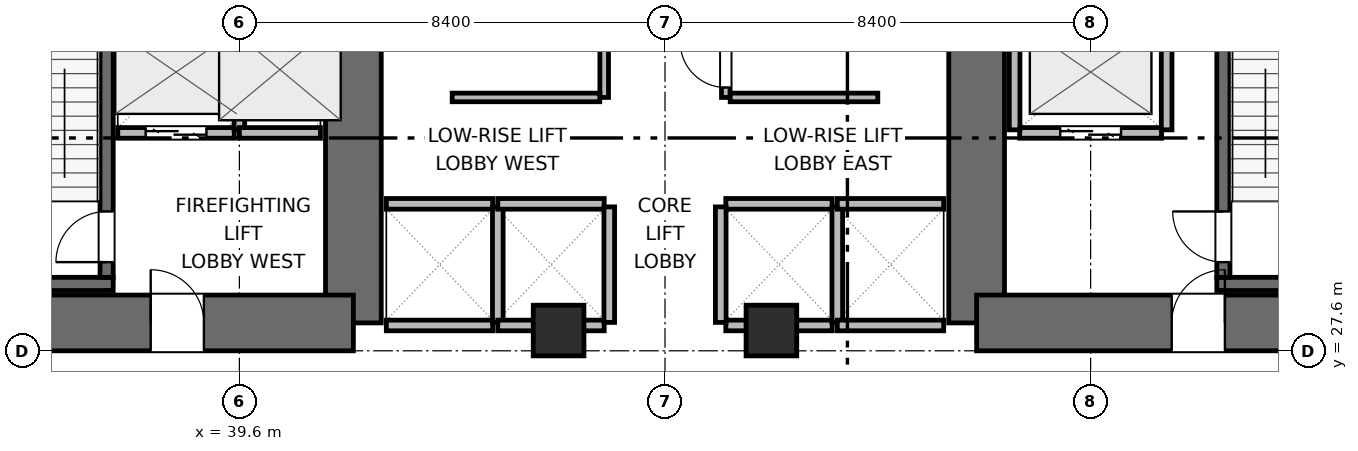
"""IFC4 building model, lengths in metres.
Left out: names, types, materials, properties, quantities, classifications, styles, units other than length and angle.
Written with IfcOpenShell. Run it as: python <this file> out.ifc"""

import sys

from ifc_helpers import new_model, si_unit, direction, frame, frame_2d, origin, origin_2d, place, context, subcontext, project, spatial, rectangle, extrude, element, fill, save


model = new_model("IFC4")
c1 = context("Model", 3, precision=1e-05, world=origin(), true_north=direction((0.0, 1.0)))
c2 = subcontext(c1, "Body", "Model", "MODEL_VIEW")
j1 = project(units=[si_unit("LENGTHUNIT", "METRE"), si_unit("PLANEANGLEUNIT", "RADIAN")], contexts=[c1])
p1 = place(None, origin())
s1 = spatial("IfcSite", under=j1, at=p1, CompositionType="ELEMENT")
p2 = place(p1, origin())
s2 = spatial("IfcBuilding", under=s1, at=p2, CompositionType="ELEMENT")
p3 = place(p2, frame((0.0, 0.0, 8.7)))
s3 = spatial("IfcBuildingStorey", under=s2, at=p3, CompositionType="ELEMENT", Elevation=8.7)
p4 = place(p3, frame((41.85, 28.15, 0.0), z_axis=(0.0, 0.0, 1.0), x_axis=(0.0, 1.0, 0.0)))
e1 = element("IfcWall", 1, at=p4, inside=s3, PredefinedType="SHEAR", context=c2, shape_type="SweptSolid", body=[
    extrude(rectangle(XDim=6.25, YDim=1.1, at=frame_2d((3.125, 0.0))), origin(), (0.0, 0.0, 1.0), 4.2),
])
p5 = place(p3, frame((32.95, 28.15, 0.0), z_axis=(0.0, 0.0, 1.0), x_axis=(1.0, 0.0, 0.0)))
e2 = element("IfcWall", 2, at=p5, inside=s3, PredefinedType="SHEAR", context=c2, shape_type="SweptSolid", body=[
    extrude(rectangle(XDim=8.9, YDim=1.1, at=frame_2d((4.45, 0.0))), origin(), (0.0, 0.0, 1.0), 4.2),
])
p6 = place(p5, frame((4.9, 0.0, 0.0)))
e3 = element("IfcOpeningElement", 3, at=p6, cuts=e2, PredefinedType="OPENING", context=c2, shape_type="SweptSolid", body=[
    extrude(rectangle(XDim=1.05, YDim=2.04, at=frame_2d((0.525, 1.02))), frame((0.0, 0.56, 0.0), z_axis=(0.0, -1.0, 0.0), x_axis=(1.0, 0.0, 0.0)), (0.0, 0.0, 1.0), 1.12),
])
p7 = place(p3, frame((54.15, 28.15, 0.0), z_axis=(0.0, 0.0, 1.0), x_axis=(0.0, 1.0, 0.0)))
e4 = element("IfcWall", 4, at=p7, inside=s3, PredefinedType="SHEAR", context=c2, shape_type="SweptSolid", body=[
    extrude(rectangle(XDim=7.65, YDim=1.1, at=frame_2d((3.825, 0.0))), origin(), (0.0, 0.0, 1.0), 4.2),
])
p8 = place(p3, frame((54.15, 28.15, 0.0), z_axis=(0.0, 0.0, 1.0), x_axis=(1.0, 0.0, 0.0)))
e5 = element("IfcWall", 5, at=p8, inside=s3, PredefinedType="SHEAR", context=c2, shape_type="SweptSolid", body=[
    extrude(rectangle(XDim=8.9, YDim=1.1, at=frame_2d((4.45, 0.0))), origin(), (0.0, 0.0, 1.0), 4.2),
])
p9 = place(p8, frame((3.85, 0.0, 0.0)))
e6 = element("IfcOpeningElement", 6, at=p9, cuts=e5, PredefinedType="OPENING", context=c2, shape_type="SweptSolid", body=[
    extrude(rectangle(XDim=1.05, YDim=2.04, at=frame_2d((0.525, 1.02))), frame((0.0, 0.56, 0.0), z_axis=(0.0, -1.0, 0.0), x_axis=(1.0, 0.0, 0.0)), (0.0, 0.0, 1.0), 1.12),
])
p10 = place(p3, frame((33.5, 28.92, 0.0), z_axis=(0.0, 0.0, 1.0), x_axis=(1.0, 0.0, 0.0)))
e7 = element("IfcWall", 7, at=p10, inside=s3, PredefinedType="SHEAR", context=c2, shape_type="SweptSolid", body=[
    extrude(rectangle(XDim=3.61, YDim=0.26, at=frame_2d((1.805, 0.0))), origin(), (0.0, 0.0, 1.0), 4.2),
])
p11 = place(p3, frame((36.98, 29.05, 0.0), z_axis=(0.0, 0.0, 1.0), x_axis=(0.0, 1.0, 0.0)))
e8 = element("IfcWall", 8, at=p11, inside=s3, PredefinedType="SHEAR", context=c2, shape_type="SweptSolid", body=[
    extrude(rectangle(XDim=7.6, YDim=0.26, at=frame_2d((3.8, 0.0))), origin(), (0.0, 0.0, 1.0), 4.2),
])
p12 = place(p11, frame((0.3, 0.0, 0.0)))
e9 = element("IfcOpeningElement", 9, at=p12, cuts=e8, PredefinedType="OPENING", context=c2, shape_type="SweptSolid", body=[
    extrude(rectangle(XDim=1.0, YDim=2.04, at=frame_2d((0.5, 1.02))), frame((0.0, 0.14, 0.0), z_axis=(0.0, -1.0, 0.0), x_axis=(1.0, 0.0, 0.0)), (0.0, 0.0, 1.0), 0.28),
])
p13 = place(p3, frame((58.89, 28.92, 0.0), z_axis=(0.0, 0.0, 1.0), x_axis=(1.0, 0.0, 0.0)))
e10 = element("IfcWall", 10, at=p13, inside=s3, PredefinedType="SHEAR", context=c2, shape_type="SweptSolid", body=[
    extrude(rectangle(XDim=3.61, YDim=0.26, at=frame_2d((1.805, 0.0))), origin(), (0.0, 0.0, 1.0), 4.2),
])
p14 = place(p3, frame((59.02, 29.05, 0.0), z_axis=(0.0, 0.0, 1.0), x_axis=(0.0, 1.0, 0.0)))
e11 = element("IfcWall", 11, at=p14, inside=s3, PredefinedType="SHEAR", context=c2, shape_type="SweptSolid", body=[
    extrude(rectangle(XDim=7.6, YDim=0.26, at=frame_2d((3.8, 0.0))), origin(), (0.0, 0.0, 1.0), 4.2),
])
p15 = place(p14, frame((0.3, 0.0, 0.0)))
e12 = element("IfcOpeningElement", 12, at=p15, cuts=e11, PredefinedType="OPENING", context=c2, shape_type="SweptSolid", body=[
    extrude(rectangle(XDim=1.0, YDim=2.04, at=frame_2d((0.5, 1.02))), frame((0.0, 0.14, 0.0), z_axis=(0.0, -1.0, 0.0), x_axis=(1.0, 0.0, 0.0)), (0.0, 0.0, 1.0), 0.28),
])
for number, where, z_axis, x_axis in (
    (13, (45.9, 28.0, 0.0), (0.0, 0.0, 1.0), (1.0, 0.0, 0.0)),
    (14, (50.1, 28.0, 0.0), (0.0, 0.0, 1.0), (1.0, 0.0, 0.0)),
):
    element("IfcColumn", number, at=place(p3, frame(where, z_axis=z_axis, x_axis=x_axis)), inside=s3, PredefinedType="COLUMN", context=c2, shape_type="SweptSolid", body=[
        extrude(rectangle(XDim=1.0, YDim=1.0, at=origin_2d()), origin(), (0.0, 0.0, 1.0), 4.2),
    ])
p16 = place(p3, frame((37.2, 31.9, 0.0), z_axis=(0.0, 0.0, 1.0), x_axis=(1.0, 0.0, 0.0)))
e15 = element("IfcWall", 15, at=p16, inside=s3, PredefinedType="PARTITIONING", context=c2, shape_type="SweptSolid", body=[
    extrude(rectangle(XDim=2.3, YDim=0.21, at=frame_2d((1.15, 0.0))), origin(), (0.0, 0.0, 1.0), 3.88),
])
p17 = place(p16, frame((0.55, 0.0, 0.0)))
e16 = element("IfcOpeningElement", 16, at=p17, cuts=e15, PredefinedType="OPENING", context=c2, shape_type="SweptSolid", body=[
    extrude(rectangle(XDim=1.2, YDim=2.04, at=frame_2d((0.6, 1.02))), frame((0.0, 0.115, 0.0), z_axis=(0.0, -1.0, 0.0), x_axis=(1.0, 0.0, 0.0)), (0.0, 0.0, 1.0), 0.23),
])
p18 = place(p3, frame((39.6, 31.96, 0.0), z_axis=(0.0, 0.0, 1.0), x_axis=(0.0, 1.0, 0.0)))
e17 = element("IfcWall", 17, at=p18, inside=s3, PredefinedType="PARTITIONING", context=c2, shape_type="SweptSolid", body=[
    extrude(rectangle(XDim=2.28, YDim=0.21, at=frame_2d((1.14, 0.0))), origin(), (0.0, 0.0, 1.0), 3.88),
])
p19 = place(p3, frame((55.0, 31.9, 0.0), z_axis=(0.0, 0.0, 1.0), x_axis=(1.0, 0.0, 0.0)))
e18 = element("IfcWall", 18, at=p19, inside=s3, PredefinedType="PARTITIONING", context=c2, shape_type="SweptSolid", body=[
    extrude(rectangle(XDim=2.8, YDim=0.21, at=frame_2d((1.4, 0.0))), origin(), (0.0, 0.0, 1.0), 3.88),
])
p20 = place(p19, frame((0.8, 0.0, 0.0)))
e19 = element("IfcOpeningElement", 19, at=p20, cuts=e18, PredefinedType="OPENING", context=c2, shape_type="SweptSolid", body=[
    extrude(rectangle(XDim=1.2, YDim=2.04, at=frame_2d((0.6, 1.02))), frame((0.0, 0.115, 0.0), z_axis=(0.0, -1.0, 0.0), x_axis=(1.0, 0.0, 0.0)), (0.0, 0.0, 1.0), 0.23),
])
for number, where, z_axis, x_axis in (
    (20, (54.9, 31.96, 0.0), (0.0, 0.0, 1.0), (0.0, 1.0, 0.0)),
    (21, (57.9, 31.96, 0.0), (0.0, 0.0, 1.0), (0.0, 1.0, 0.0)),
):
    element("IfcWall", number, at=place(p3, frame(where, z_axis=z_axis, x_axis=x_axis)), inside=s3, PredefinedType="PARTITIONING", context=c2, shape_type="SweptSolid", body=[
        extrude(rectangle(XDim=2.28, YDim=0.21, at=frame_2d((1.14, 0.0))), origin(), (0.0, 0.0, 1.0), 3.88),
    ])
p21 = place(p3, frame((39.6, 31.9, 0.0), z_axis=(0.0, 0.0, 1.0), x_axis=(1.0, 0.0, 0.0)))
e22 = element("IfcWall", 22, at=p21, inside=s3, PredefinedType="PARTITIONING", context=c2, shape_type="SweptSolid", body=[
    extrude(rectangle(XDim=1.6, YDim=0.21, at=frame_2d((0.8, 0.0))), origin(), (0.0, 0.0, 1.0), 3.88),
])
p22 = place(p3, frame((42.5, 30.5, 0.0), z_axis=(0.0, 0.0, 1.0), x_axis=(1.0, 0.0, 0.0)))
e23 = element("IfcWall", 23, at=p22, inside=s3, PredefinedType="PARTITIONING", context=c2, shape_type="SweptSolid", body=[
    extrude(rectangle(XDim=2.1, YDim=0.21, at=frame_2d((1.05, 0.0))), origin(), (0.0, 0.0, 1.0), 3.88),
])
p23 = place(p3, frame((42.5, 28.1, 0.0), z_axis=(0.0, 0.0, 1.0), x_axis=(1.0, 0.0, 0.0)))
e24 = element("IfcWall", 24, at=p23, inside=s3, PredefinedType="PARTITIONING", context=c2, shape_type="SweptSolid", body=[
    extrude(rectangle(XDim=2.1, YDim=0.21, at=frame_2d((1.05, 0.0))), origin(), (0.0, 0.0, 1.0), 2.765),
])
p24 = place(p3, frame((44.7, 28.16, 0.0), z_axis=(0.0, 0.0, 1.0), x_axis=(0.0, 1.0, 0.0)))
e25 = element("IfcWall", 25, at=p24, inside=s3, PredefinedType="PARTITIONING", context=c2, shape_type="SweptSolid", body=[
    extrude(rectangle(XDim=2.28, YDim=0.21, at=frame_2d((1.14, 0.0))), origin(), (0.0, 0.0, 1.0), 3.88),
])
p25 = place(p3, frame((44.7, 30.5, 0.0), z_axis=(0.0, 0.0, 1.0), x_axis=(1.0, 0.0, 0.0)))
e26 = element("IfcWall", 26, at=p25, inside=s3, PredefinedType="PARTITIONING", context=c2, shape_type="SweptSolid", body=[
    extrude(rectangle(XDim=2.1, YDim=0.21, at=frame_2d((1.05, 0.0))), origin(), (0.0, 0.0, 1.0), 3.88),
])
p26 = place(p3, frame((44.7, 28.1, 0.0), z_axis=(0.0, 0.0, 1.0), x_axis=(1.0, 0.0, 0.0)))
e27 = element("IfcWall", 27, at=p26, inside=s3, PredefinedType="PARTITIONING", context=c2, shape_type="SweptSolid", body=[
    extrude(rectangle(XDim=2.1, YDim=0.21, at=frame_2d((1.05, 0.0))), origin(), (0.0, 0.0, 1.0), 2.765),
])
p27 = place(p3, frame((46.9, 28.16, 0.0), z_axis=(0.0, 0.0, 1.0), x_axis=(0.0, 1.0, 0.0)))
e28 = element("IfcWall", 28, at=p27, inside=s3, PredefinedType="PARTITIONING", context=c2, shape_type="SweptSolid", body=[
    extrude(rectangle(XDim=2.28, YDim=0.21, at=frame_2d((1.14, 0.0))), origin(), (0.0, 0.0, 1.0), 3.88),
])
p28 = place(p3, frame((49.2, 30.5, 0.0), z_axis=(0.0, 0.0, 1.0), x_axis=(1.0, 0.0, 0.0)))
e29 = element("IfcWall", 29, at=p28, inside=s3, PredefinedType="PARTITIONING", context=c2, shape_type="SweptSolid", body=[
    extrude(rectangle(XDim=2.1, YDim=0.21, at=frame_2d((1.05, 0.0))), origin(), (0.0, 0.0, 1.0), 3.88),
])
p29 = place(p3, frame((49.2, 28.1, 0.0), z_axis=(0.0, 0.0, 1.0), x_axis=(1.0, 0.0, 0.0)))
e30 = element("IfcWall", 30, at=p29, inside=s3, PredefinedType="PARTITIONING", context=c2, shape_type="SweptSolid", body=[
    extrude(rectangle(XDim=2.1, YDim=0.21, at=frame_2d((1.05, 0.0))), origin(), (0.0, 0.0, 1.0), 2.765),
])
for number, where, z_axis, x_axis in (
    (31, (49.1, 28.16, 0.0), (0.0, 0.0, 1.0), (0.0, 1.0, 0.0)),
    (32, (51.4, 28.16, 0.0), (0.0, 0.0, 1.0), (0.0, 1.0, 0.0)),
):
    element("IfcWall", number, at=place(p3, frame(where, z_axis=z_axis, x_axis=x_axis)), inside=s3, PredefinedType="PARTITIONING", context=c2, shape_type="SweptSolid", body=[
        extrude(rectangle(XDim=2.28, YDim=0.21, at=frame_2d((1.14, 0.0))), origin(), (0.0, 0.0, 1.0), 3.88),
    ])
p30 = place(p3, frame((51.4, 30.5, 0.0), z_axis=(0.0, 0.0, 1.0), x_axis=(1.0, 0.0, 0.0)))
e33 = element("IfcWall", 33, at=p30, inside=s3, PredefinedType="PARTITIONING", context=c2, shape_type="SweptSolid", body=[
    extrude(rectangle(XDim=2.1, YDim=0.21, at=frame_2d((1.05, 0.0))), origin(), (0.0, 0.0, 1.0), 3.88),
])
p31 = place(p3, frame((51.4, 28.1, 0.0), z_axis=(0.0, 0.0, 1.0), x_axis=(1.0, 0.0, 0.0)))
e34 = element("IfcWall", 34, at=p31, inside=s3, PredefinedType="PARTITIONING", context=c2, shape_type="SweptSolid", body=[
    extrude(rectangle(XDim=2.1, YDim=0.21, at=frame_2d((1.05, 0.0))), origin(), (0.0, 0.0, 1.0), 2.765),
])
p32 = place(p3, frame((46.8, 32.6, 0.0), z_axis=(0.0, 0.0, 1.0), x_axis=(0.0, 1.0, 0.0)))
e35 = element("IfcWall", 35, at=p32, inside=s3, PredefinedType="PARTITIONING", context=c2, shape_type="SweptSolid", body=[
    extrude(rectangle(XDim=3.8, YDim=0.17, at=frame_2d((1.9, 0.0))), origin(), (0.0, 0.0, 1.0), 3.88),
])
p33 = place(p32, frame((1.45, 0.0, 0.0)))
e36 = element("IfcOpeningElement", 36, at=p33, cuts=e35, PredefinedType="OPENING", context=c2, shape_type="SweptSolid", body=[
    extrude(rectangle(XDim=0.9, YDim=2.02, at=frame_2d((0.45, 1.01))), frame((0.0, 0.095, 0.0), z_axis=(0.0, -1.0, 0.0), x_axis=(1.0, 0.0, 0.0)), (0.0, 0.0, 1.0), 0.19),
])
p34 = place(p3, frame((43.8, 32.6, 0.0), z_axis=(0.0, 0.0, 1.0), x_axis=(1.0, 0.0, 0.0)))
e37 = element("IfcWall", 37, at=p34, inside=s3, PredefinedType="PARTITIONING", context=c2, shape_type="SweptSolid", body=[
    extrude(rectangle(XDim=2.913, YDim=0.17, at=frame_2d((1.457, 0.0))), origin(), (0.0, 0.0, 1.0), 3.88),
])
p35 = place(p3, frame((49.2, 32.6, 0.0), z_axis=(0.0, 0.0, 1.0), x_axis=(0.0, 1.0, 0.0)))
e38 = element("IfcWall", 38, at=p35, inside=s3, PredefinedType="PARTITIONING", context=c2, shape_type="SweptSolid", body=[
    extrude(rectangle(XDim=3.4, YDim=0.17, at=frame_2d((1.7, 0.0))), origin(), (0.0, 0.0, 1.0), 3.88),
])
p36 = place(p35, frame((0.196, 0.0, 0.0)))
e39 = element("IfcOpeningElement", 39, at=p36, cuts=e38, PredefinedType="OPENING", context=c2, shape_type="SweptSolid", body=[
    extrude(rectangle(XDim=0.9, YDim=2.02, at=frame_2d((0.45, 1.01))), frame((0.0, 0.095, 0.0), z_axis=(0.0, -1.0, 0.0), x_axis=(1.0, 0.0, 0.0)), (0.0, 0.0, 1.0), 0.19),
])
p37 = place(p35, frame((1.896, 0.0, 0.0)))
e40 = element("IfcOpeningElement", 40, at=p37, cuts=e38, PredefinedType="OPENING", context=c2, shape_type="SweptSolid", body=[
    extrude(rectangle(XDim=0.9, YDim=2.02, at=frame_2d((0.45, 1.01))), frame((0.0, 0.095, 0.0), z_axis=(0.0, -1.0, 0.0), x_axis=(1.0, 0.0, 0.0)), (0.0, 0.0, 1.0), 0.19),
])
p38 = place(p3, frame((49.287, 32.6, 0.0), z_axis=(0.0, 0.0, 1.0), x_axis=(1.0, 0.0, 0.0)))
e41 = element("IfcWall", 41, at=p38, inside=s3, PredefinedType="PARTITIONING", context=c2, shape_type="SweptSolid", body=[
    extrude(rectangle(XDim=2.913, YDim=0.17, at=frame_2d((1.457, 0.0))), origin(), (0.0, 0.0, 1.0), 3.88),
])
p39 = place(p12, origin())
e42 = element("IfcDoor", 42, at=p39, inside=s3, OperationType="SINGLE_SWING_LEFT", PredefinedType="DOOR", context=c2, shape_type="SweptSolid", body=[
    extrude(rectangle(XDim=1.0, YDim=2.04, at=frame_2d((0.5, 1.02))), frame((0.0, 0.025, 0.0), z_axis=(0.0, -1.0, 0.0), x_axis=(1.0, 0.0, 0.0)), (0.0, 0.0, 1.0), 0.05),
])
fill(e9, e42)
p40 = place(p15, origin())
e43 = element("IfcDoor", 43, at=p40, inside=s3, OperationType="SINGLE_SWING_RIGHT", PredefinedType="DOOR", context=c2, shape_type="SweptSolid", body=[
    extrude(rectangle(XDim=1.0, YDim=2.04, at=frame_2d((0.5, 1.02))), frame((0.0, 0.025, 0.0), z_axis=(0.0, -1.0, 0.0), x_axis=(1.0, 0.0, 0.0)), (0.0, 0.0, 1.0), 0.05),
])
fill(e12, e43)
p41 = place(p17, origin())
e44 = element("IfcDoor", 44, at=p41, inside=s3, OperationType="DOUBLE_DOOR_SLIDING", PredefinedType="DOOR", context=c2, shape_type="SweptSolid", body=[
    extrude(rectangle(XDim=1.2, YDim=2.04, at=frame_2d((0.6, 1.02))), frame((0.0, 0.025, 0.0), z_axis=(0.0, -1.0, 0.0), x_axis=(1.0, 0.0, 0.0)), (0.0, 0.0, 1.0), 0.05),
])
fill(e16, e44)
p42 = place(p20, origin())
e45 = element("IfcDoor", 45, at=p42, inside=s3, OperationType="DOUBLE_DOOR_SLIDING", PredefinedType="DOOR", context=c2, shape_type="SweptSolid", body=[
    extrude(rectangle(XDim=1.2, YDim=2.04, at=frame_2d((0.6, 1.02))), frame((0.0, 0.025, 0.0), z_axis=(0.0, -1.0, 0.0), x_axis=(1.0, 0.0, 0.0)), (0.0, 0.0, 1.0), 0.05),
])
fill(e19, e45)
p43 = place(p6, origin())
e46 = element("IfcDoor", 46, at=p43, inside=s3, OperationType="SINGLE_SWING_LEFT", PredefinedType="DOOR", context=c2, shape_type="SweptSolid", body=[
    extrude(rectangle(XDim=1.05, YDim=2.04, at=frame_2d((0.525, 1.02))), frame((0.0, 0.025, 0.0), z_axis=(0.0, -1.0, 0.0), x_axis=(1.0, 0.0, 0.0)), (0.0, 0.0, 1.0), 0.05),
])
fill(e3, e46)
p44 = place(p9, origin())
e47 = element("IfcDoor", 47, at=p44, inside=s3, OperationType="SINGLE_SWING_RIGHT", PredefinedType="DOOR", context=c2, shape_type="SweptSolid", body=[
    extrude(rectangle(XDim=1.05, YDim=2.04, at=frame_2d((0.525, 1.02))), frame((0.0, 0.025, 0.0), z_axis=(0.0, -1.0, 0.0), x_axis=(1.0, 0.0, 0.0)), (0.0, 0.0, 1.0), 0.05),
])
fill(e6, e47)
p45 = place(p36, origin())
e48 = element("IfcDoor", 48, at=p45, inside=s3, OperationType="SINGLE_SWING_RIGHT", PredefinedType="DOOR", context=c2, shape_type="SweptSolid", body=[
    extrude(rectangle(XDim=0.9, YDim=2.02, at=frame_2d((0.45, 1.01))), frame((0.0, 0.025, 0.0), z_axis=(0.0, -1.0, 0.0), x_axis=(1.0, 0.0, 0.0)), (0.0, 0.0, 1.0), 0.05),
])
fill(e39, e48)
save(model, sys.argv[1])
